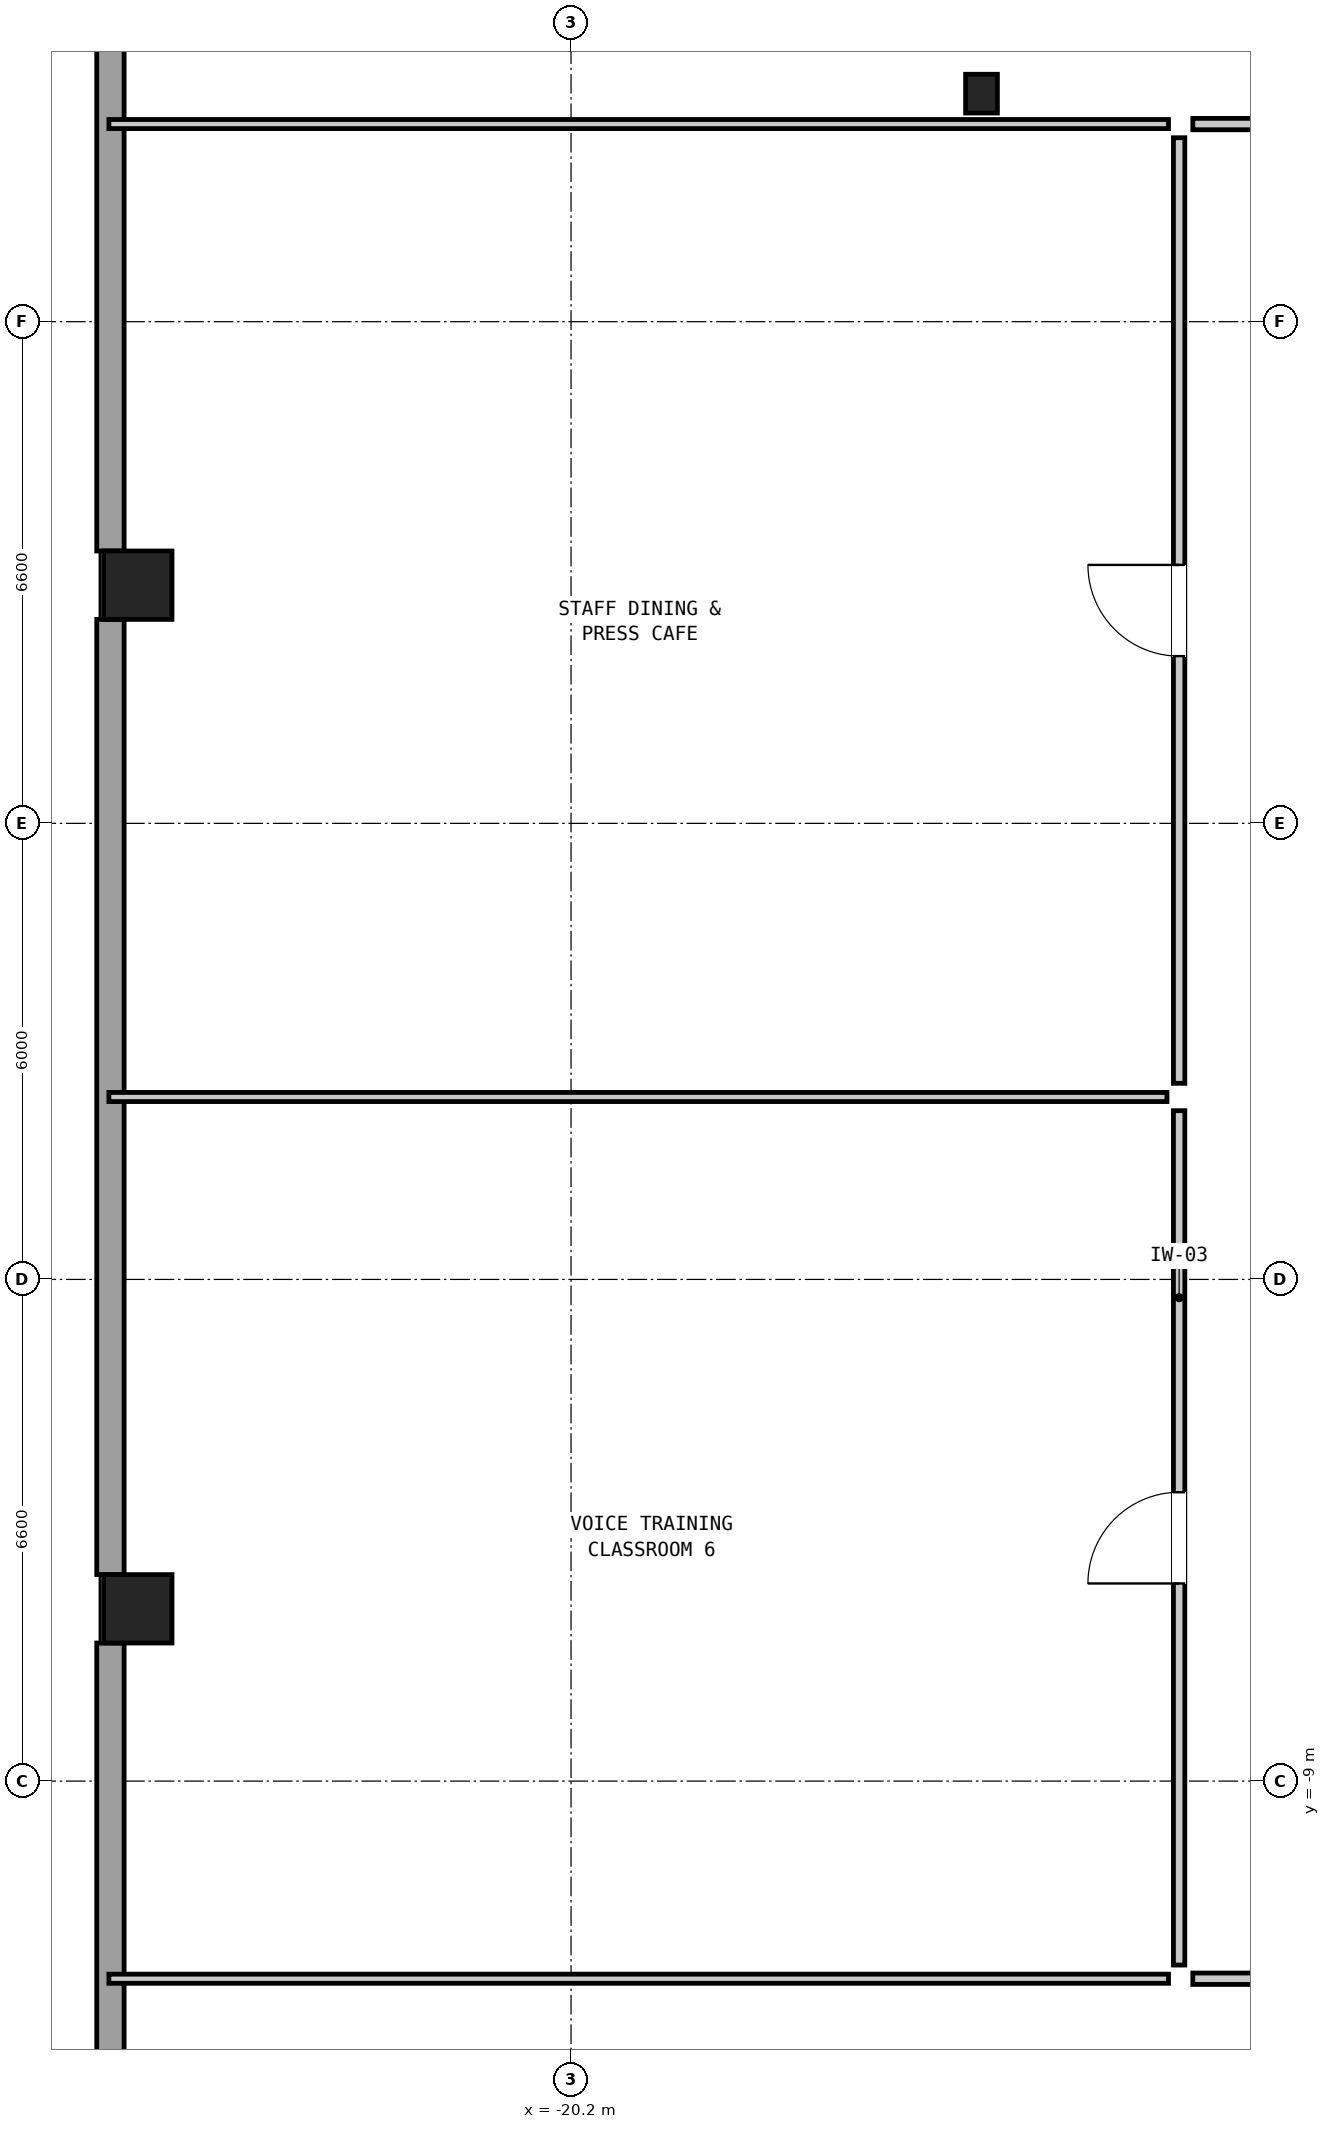
"""IFC4 building model, lengths in metres.
Left out: names, types, materials, properties, quantities, classifications, styles, units other than length and angle.
Written with IfcOpenShell. Run it as: python <this file> out.ifc"""

import sys

from ifc_helpers import new_model, si_unit, direction, frame, frame_2d, origin, origin_2d, place, context, subcontext, project, spatial, rectangle, hollow_rectangle, i_section, extrude, element, fill, save


model = new_model("IFC4")
c1 = context("Model", 3, precision=1e-05, world=origin(), true_north=direction((0.0, 1.0)))
c2 = subcontext(c1, "Body", "Model", "MODEL_VIEW")
j1 = project(units=[si_unit("LENGTHUNIT", "METRE"), si_unit("PLANEANGLEUNIT", "RADIAN")], contexts=[c1])
p1 = place(None, origin())
s1 = spatial("IfcSite", under=j1, at=p1, CompositionType="ELEMENT")
p2 = place(p1, origin())
s2 = spatial("IfcBuilding", under=s1, at=p2, CompositionType="ELEMENT")
p3 = place(p2, frame((0.0, 0.0, 50.5)))
s3 = spatial("IfcBuildingStorey", under=s2, at=p3, CompositionType="ELEMENT", Elevation=50.5)
for number, where, z_axis, x_axis in (
    (1, (-25.9, 6.733, 0.0), (0.0, 0.0, 1.0), (0.0, 1.0, 0.0)),
    (2, (-25.9, -6.733, 0.0), (0.0, 0.0, 1.0), (0.0, 1.0, 0.0)),
):
    element("IfcColumn", number, at=place(p3, frame(where, z_axis=z_axis, x_axis=x_axis)), inside=s3, PredefinedType="COLUMN", context=c2, shape_type="SweptSolid", body=[
        extrude(hollow_rectangle(XDim=0.9, YDim=0.9, WallThickness=0.055, at=origin_2d()), origin(), (0.0, 0.0, 1.0), 3.05),
    ])
p4 = place(p3, frame((-14.8, 13.2, 0.0), z_axis=(0.0, 0.0, 1.0), x_axis=(1.0, 0.0, 0.0)))
e3 = element("IfcColumn", 3, at=p4, inside=s3, PredefinedType="COLUMN", context=c2, shape_type="SweptSolid", body=[
    extrude(i_section(OverallWidth=0.418, OverallDepth=0.51, WebThickness=0.042, FlangeThickness=0.068, at=origin_2d()), origin(), (0.0, 0.0, 1.0), 3.05),
])
p5 = place(p3, frame((-26.26, -19.762, 0.0), z_axis=(0.0, 0.0, 1.0), x_axis=(0.0, 1.0, 0.0)))
e4 = element("IfcWall", 4, at=p5, inside=s3, PredefinedType="SOLIDWALL", context=c2, shape_type="SweptSolid", body=[
    extrude(rectangle(XDim=12.579, YDim=0.36, at=frame_2d((6.289, 0.0))), origin(), (0.0, 0.0, 1.0), 0.95),
])
p6 = place(p3, frame((-26.26, -6.283, 0.0), z_axis=(0.0, 0.0, 1.0), x_axis=(0.0, 1.0, 0.0)))
e5 = element("IfcWall", 5, at=p6, inside=s3, PredefinedType="SOLIDWALL", context=c2, shape_type="SweptSolid", body=[
    extrude(rectangle(XDim=12.566, YDim=0.36, at=frame_2d((6.283, 0.0))), origin(), (0.0, 0.0, 1.0), 0.95),
])
p7 = place(p3, frame((-26.26, 7.183, 0.0), z_axis=(0.0, 0.0, 1.0), x_axis=(0.0, 1.0, 0.0)))
e6 = element("IfcWall", 6, at=p7, inside=s3, PredefinedType="SOLIDWALL", context=c2, shape_type="SweptSolid", body=[
    extrude(rectangle(XDim=12.579, YDim=0.36, at=frame_2d((6.289, 0.0))), origin(), (0.0, 0.0, 1.0), 0.95),
])
p8 = place(p3, frame((-26.28, 12.8, 0.0), z_axis=(0.0, 0.0, 1.0), x_axis=(1.0, 0.0, 0.0)))
e7 = element("IfcWall", 7, at=p8, inside=s3, PredefinedType="PARTITIONING", context=c2, shape_type="SweptSolid", body=[
    extrude(rectangle(XDim=13.94, YDim=0.12, at=frame_2d((6.97, 0.0))), origin(), (0.0, 0.0, 1.0), 2.83),
])
p9 = place(p3, frame((-26.28, -11.6, 0.0), z_axis=(0.0, 0.0, 1.0), x_axis=(1.0, 0.0, 0.0)))
e8 = element("IfcWall", 8, at=p9, inside=s3, PredefinedType="PARTITIONING", context=c2, shape_type="SweptSolid", body=[
    extrude(rectangle(XDim=13.94, YDim=0.12, at=frame_2d((6.97, 0.0))), origin(), (0.0, 0.0, 1.0), 2.274),
])
p10 = place(p3, frame((-26.28, 0.0, 0.0), z_axis=(0.0, 0.0, 1.0), x_axis=(1.0, 0.0, 0.0)))
e9 = element("IfcWall", 9, at=p10, inside=s3, PredefinedType="PARTITIONING", context=c2, shape_type="SweptSolid", body=[
    extrude(rectangle(XDim=13.92, YDim=0.12, at=frame_2d((6.96, 0.0))), origin(), (0.0, 0.0, 1.0), 2.83),
])
p11 = place(p3, frame((-12.02, 12.8, 0.0), z_axis=(0.0, 0.0, 1.0), x_axis=(1.0, 0.0, 0.0)))
e10 = element("IfcWall", 10, at=p11, inside=s3, PredefinedType="PARTITIONING", context=c2, shape_type="SweptSolid", body=[
    extrude(rectangle(XDim=6.44, YDim=0.15, at=frame_2d((3.22, 0.0))), origin(), (0.0, 0.0, 1.0), 2.83),
])
p12 = place(p11, frame((3.02, 0.0, 0.0)))
e11 = element("IfcOpeningElement", 11, at=p12, cuts=e10, PredefinedType="OPENING", context=c2, shape_type="SweptSolid", body=[
    extrude(rectangle(XDim=1.2, YDim=2.1, at=frame_2d((0.6, 1.05))), frame((0.0, 0.087, 0.0), z_axis=(0.0, -1.0, 0.0), x_axis=(1.0, 0.0, 0.0)), (0.0, 0.0, 1.0), 0.174),
])
p13 = place(p3, frame((-12.02, -11.6, 0.0), z_axis=(0.0, 0.0, 1.0), x_axis=(1.0, 0.0, 0.0)))
e12 = element("IfcWall", 12, at=p13, inside=s3, PredefinedType="PARTITIONING", context=c2, shape_type="SweptSolid", body=[
    extrude(rectangle(XDim=11.84, YDim=0.15, at=frame_2d((5.92, 0.0))), origin(), (0.0, 0.0, 1.0), 2.274),
])
p14 = place(p13, frame((5.32, 0.0, 0.0)))
e13 = element("IfcOpeningElement", 13, at=p14, cuts=e12, PredefinedType="OPENING", context=c2, shape_type="SweptSolid", body=[
    extrude(rectangle(XDim=1.2, YDim=2.1, at=frame_2d((0.6, 1.05))), frame((0.0, 0.087, 0.0), z_axis=(0.0, -1.0, 0.0), x_axis=(1.0, 0.0, 0.0)), (0.0, 0.0, 1.0), 0.174),
])
p15 = place(p3, frame((-12.2, -11.42, 0.0), z_axis=(0.0, 0.0, 1.0), x_axis=(0.0, 1.0, 0.0)))
e14 = element("IfcWall", 14, at=p15, inside=s3, PredefinedType="PARTITIONING", context=c2, shape_type="SweptSolid", body=[
    extrude(rectangle(XDim=11.24, YDim=0.15, at=frame_2d((5.62, 0.0))), origin(), (0.0, 0.0, 1.0), 2.83),
])
p16 = place(p15, frame((5.02, 0.0, 0.0)))
e15 = element("IfcOpeningElement", 15, at=p16, cuts=e14, PredefinedType="OPENING", context=c2, shape_type="SweptSolid", body=[
    extrude(rectangle(XDim=1.2, YDim=2.1, at=frame_2d((0.6, 1.05))), frame((0.0, 0.087, 0.0), z_axis=(0.0, -1.0, 0.0), x_axis=(1.0, 0.0, 0.0)), (0.0, 0.0, 1.0), 0.174),
])
p17 = place(p3, frame((-12.2, 0.18, 0.0), z_axis=(0.0, 0.0, 1.0), x_axis=(0.0, 1.0, 0.0)))
e16 = element("IfcWall", 16, at=p17, inside=s3, PredefinedType="PARTITIONING", context=c2, shape_type="SweptSolid", body=[
    extrude(rectangle(XDim=12.44, YDim=0.15, at=frame_2d((6.22, 0.0))), origin(), (0.0, 0.0, 1.0), 2.83),
])
p18 = place(p17, frame((5.62, 0.0, 0.0)))
e17 = element("IfcOpeningElement", 17, at=p18, cuts=e16, PredefinedType="OPENING", context=c2, shape_type="SweptSolid", body=[
    extrude(rectangle(XDim=1.2, YDim=2.1, at=frame_2d((0.6, 1.05))), frame((0.0, 0.087, 0.0), z_axis=(0.0, -1.0, 0.0), x_axis=(1.0, 0.0, 0.0)), (0.0, 0.0, 1.0), 0.174),
])
p19 = place(p16, origin())
e18 = element("IfcDoor", 18, at=p19, inside=s3, OperationType="SINGLE_SWING_LEFT", PredefinedType="DOOR", context=c2, shape_type="SweptSolid", body=[
    extrude(rectangle(XDim=1.2, YDim=2.1, at=frame_2d((0.6, 1.05))), frame((0.0, 0.025, 0.0), z_axis=(0.0, -1.0, 0.0), x_axis=(1.0, 0.0, 0.0)), (0.0, 0.0, 1.0), 0.05),
])
fill(e15, e18)
p20 = place(p18, origin())
e19 = element("IfcDoor", 19, at=p20, inside=s3, OperationType="SINGLE_SWING_RIGHT", PredefinedType="DOOR", context=c2, shape_type="SweptSolid", body=[
    extrude(rectangle(XDim=1.2, YDim=2.1, at=frame_2d((0.6, 1.05))), frame((0.0, 0.025, 0.0), z_axis=(0.0, -1.0, 0.0), x_axis=(1.0, 0.0, 0.0)), (0.0, 0.0, 1.0), 0.05),
])
fill(e17, e19)
save(model, sys.argv[1])
